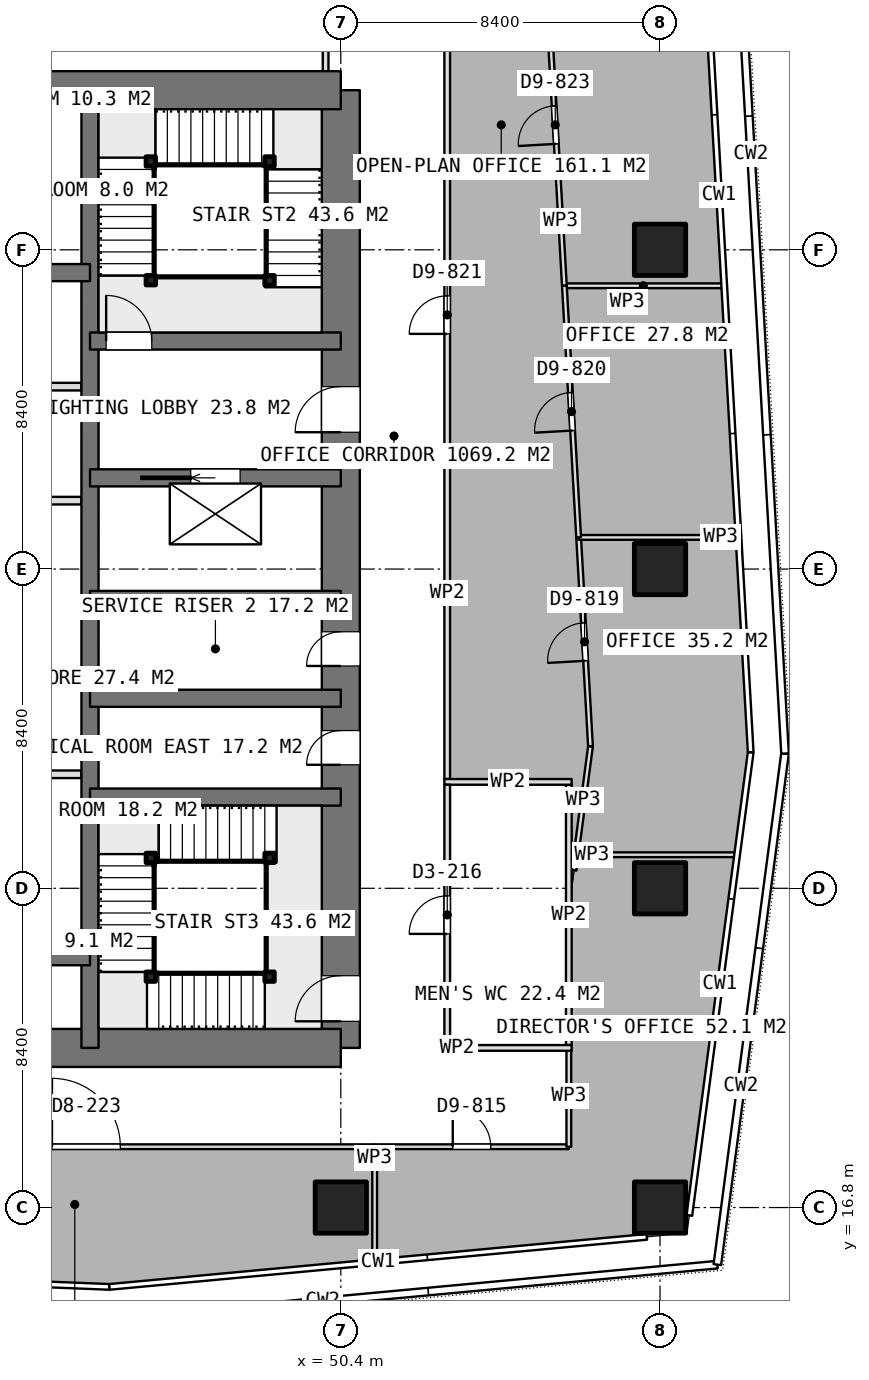
"""IFC4 building model, lengths in metres.
Left out: names, types, materials, properties, quantities, classifications, styles, units other than length and angle.
Written with IfcOpenShell. Run it as: python <this file> out.ifc"""

import sys

from ifc_helpers import new_model, si_unit, direction, frame, frame_2d, origin, origin_2d, place, context, subcontext, project, spatial, rectangle, extrude, element, fill, save


model = new_model("IFC4")
c1 = context("Model", 3, precision=1e-05, world=origin(), true_north=direction((0.0, 1.0)))
c2 = subcontext(c1, "Body", "Model", "MODEL_VIEW")
j1 = project(units=[si_unit("LENGTHUNIT", "METRE"), si_unit("PLANEANGLEUNIT", "RADIAN")], contexts=[c1])
p1 = place(None, origin())
s1 = spatial("IfcSite", under=j1, at=p1, CompositionType="ELEMENT")
p2 = place(p1, origin())
s2 = spatial("IfcBuilding", under=s1, at=p2, CompositionType="ELEMENT")
p3 = place(p2, frame((0.0, 0.0, 202.7)))
s3 = spatial("IfcBuildingStorey", under=s2, at=p3, CompositionType="ELEMENT", Elevation=202.7)
for number, where, z_axis, x_axis in (
    (1, (40.0, 21.0, 0.0), (0.0, 0.0, 1.0), (1.0, 0.0, 0.0)),
    (2, (40.0, 46.2, 0.0), (0.0, 0.0, 1.0), (1.0, 0.0, 0.0)),
):
    element("IfcWall", number, at=place(p3, frame(where, z_axis=z_axis, x_axis=x_axis)), inside=s3, PredefinedType="SHEAR", context=c2, shape_type="SweptSolid", body=[
        extrude(rectangle(XDim=10.4, YDim=1.0, at=frame_2d((5.2, 0.0))), origin(), (0.0, 0.0, 1.0), 3.75),
    ])
p4 = place(p3, frame((50.4, 21.0, 0.0), z_axis=(0.0, 0.0, 1.0), x_axis=(0.0, 1.0, 0.0)))
e3 = element("IfcWall", 3, at=p4, inside=s3, PredefinedType="SHEAR", context=c2, shape_type="SweptSolid", body=[
    extrude(rectangle(XDim=25.2, YDim=1.0, at=frame_2d((12.6, 0.0))), origin(), (0.0, 0.0, 1.0), 3.75),
])
p5 = place(p4, frame((16.2, 0.0, 0.0)))
e4 = element("IfcOpeningElement", 4, at=p5, cuts=e3, PredefinedType="OPENING", context=c2, shape_type="SweptSolid", body=[
    extrude(rectangle(XDim=1.2, YDim=2.1, at=frame_2d((0.6, 1.05))), frame((0.0, 0.51, 0.0), z_axis=(0.0, -1.0, 0.0), x_axis=(1.0, 0.0, 0.0)), (0.0, 0.0, 1.0), 1.02),
])
p6 = place(p4, frame((10.05, 0.0, 0.0)))
e5 = element("IfcOpeningElement", 5, at=p6, cuts=e3, PredefinedType="OPENING", context=c2, shape_type="SweptSolid", body=[
    extrude(rectangle(XDim=0.9, YDim=2.1, at=frame_2d((0.45, 1.05))), frame((0.0, 0.51, 0.0), z_axis=(0.0, -1.0, 0.0), x_axis=(1.0, 0.0, 0.0)), (0.0, 0.0, 1.0), 1.02),
])
p7 = place(p4, frame((7.45, 0.0, 0.0)))
e6 = element("IfcOpeningElement", 6, at=p7, cuts=e3, PredefinedType="OPENING", context=c2, shape_type="SweptSolid", body=[
    extrude(rectangle(XDim=0.9, YDim=2.1, at=frame_2d((0.45, 1.05))), frame((0.0, 0.51, 0.0), z_axis=(0.0, -1.0, 0.0), x_axis=(1.0, 0.0, 0.0)), (0.0, 0.0, 1.0), 1.02),
])
p8 = place(p4, frame((0.7, 0.0, 0.0)))
e7 = element("IfcOpeningElement", 7, at=p8, cuts=e3, PredefinedType="OPENING", context=c2, shape_type="SweptSolid", body=[
    extrude(rectangle(XDim=1.2, YDim=2.1, at=frame_2d((0.6, 1.05))), frame((0.0, 0.51, 0.0), z_axis=(0.0, -1.0, 0.0), x_axis=(1.0, 0.0, 0.0)), (0.0, 0.0, 1.0), 1.02),
])
p9 = place(p3, frame((43.8, 21.0, 0.0), z_axis=(0.0, 0.0, 1.0), x_axis=(0.0, 1.0, 0.0)))
e8 = element("IfcWall", 8, at=p9, inside=s3, PredefinedType="SHEAR", context=c2, shape_type="SweptSolid", body=[
    extrude(rectangle(XDim=25.2, YDim=0.45, at=frame_2d((12.6, 0.0))), origin(), (0.0, 0.0, 1.0), 3.75),
])
for number, where, z_axis, x_axis in (
    (9, (40.0, 23.4, 0.0), (0.0, 0.0, 1.0), (1.0, 0.0, 0.0)),
    (10, (40.0, 41.4, 0.0), (0.0, 0.0, 1.0), (1.0, 0.0, 0.0)),
):
    element("IfcWall", number, at=place(p3, frame(where, z_axis=z_axis, x_axis=x_axis)), inside=s3, PredefinedType="SHEAR", context=c2, shape_type="SweptSolid", body=[
        extrude(rectangle(XDim=3.8, YDim=0.45, at=frame_2d((1.9, 0.0))), origin(), (0.0, 0.0, 1.0), 3.75),
    ])
for number, where, z_axis, x_axis in (
    (11, (43.8, 27.6, 0.0), (0.0, 0.0, 1.0), (1.0, 0.0, 0.0)),
    (12, (43.8, 30.2, 0.0), (0.0, 0.0, 1.0), (1.0, 0.0, 0.0)),
    (13, (43.8, 32.8, 0.0), (0.0, 0.0, 1.0), (1.0, 0.0, 0.0)),
):
    element("IfcWall", number, at=place(p3, frame(where, z_axis=z_axis, x_axis=x_axis)), inside=s3, PredefinedType="SHEAR", context=c2, shape_type="SweptSolid", body=[
        extrude(rectangle(XDim=6.6, YDim=0.45, at=frame_2d((3.3, 0.0))), origin(), (0.0, 0.0, 1.0), 3.75),
    ])
p10 = place(p3, frame((43.8, 36.0, 0.0), z_axis=(0.0, 0.0, 1.0), x_axis=(1.0, 0.0, 0.0)))
e14 = element("IfcWall", 14, at=p10, inside=s3, PredefinedType="SHEAR", context=c2, shape_type="SweptSolid", body=[
    extrude(rectangle(XDim=6.6, YDim=0.45, at=frame_2d((3.3, 0.0))), origin(), (0.0, 0.0, 1.0), 3.75),
])
p11 = place(p10, frame((2.65, 0.0, 0.0)))
e15 = element("IfcOpeningElement", 15, at=p11, cuts=e14, PredefinedType="OPENING", context=c2, shape_type="SweptSolid", body=[
    extrude(rectangle(XDim=1.3, YDim=2.1, at=frame_2d((0.65, 1.05))), frame((0.0, 0.235, 0.0), z_axis=(0.0, -1.0, 0.0), x_axis=(1.0, 0.0, 0.0)), (0.0, 0.0, 1.0), 0.47),
])
p12 = place(p3, frame((43.8, 39.6, 0.0), z_axis=(0.0, 0.0, 1.0), x_axis=(1.0, 0.0, 0.0)))
e16 = element("IfcWall", 16, at=p12, inside=s3, PredefinedType="SHEAR", context=c2, shape_type="SweptSolid", body=[
    extrude(rectangle(XDim=6.6, YDim=0.45, at=frame_2d((3.3, 0.0))), origin(), (0.0, 0.0, 1.0), 3.75),
])
p13 = place(p12, frame((0.425, 0.0, 0.0)))
e17 = element("IfcOpeningElement", 17, at=p13, cuts=e16, PredefinedType="OPENING", context=c2, shape_type="SweptSolid", body=[
    extrude(rectangle(XDim=1.2, YDim=2.1, at=frame_2d((0.6, 1.05))), frame((0.0, 0.235, 0.0), z_axis=(0.0, -1.0, 0.0), x_axis=(1.0, 0.0, 0.0)), (0.0, 0.0, 1.0), 0.47),
])
for number, where, z_axis, x_axis in (
    (18, (50.4, 16.8, 0.0), (0.0, 0.0, 1.0), (1.0, 0.0, 0.0)),
    (19, (58.8, 16.8, 0.0), (0.0, 0.0, 1.0), (1.0, 0.0, 0.0)),
    (20, (58.8, 25.2, 0.0), (0.0, 0.0, 1.0), (1.0, 0.0, 0.0)),
    (21, (58.8, 33.6, 0.0), (0.0, 0.0, 1.0), (1.0, 0.0, 0.0)),
    (22, (58.8, 42.0, 0.0), (0.0, 0.0, 1.0), (1.0, 0.0, 0.0)),
):
    element("IfcColumn", number, at=place(p3, frame(where, z_axis=z_axis, x_axis=x_axis)), inside=s3, PredefinedType="COLUMN", context=c2, shape_type="SweptSolid", body=[
        extrude(rectangle(XDim=1.35, YDim=1.35, at=origin_2d()), origin(), (0.0, 0.0, 1.0), 3.75),
    ])
for number, where, z_axis, x_axis in (
    (23, (40.225, 35.4, 0.0), (0.0, 0.0, 1.0), (1.0, 0.0, 0.0)),
    (24, (40.225, 38.4, 0.0), (0.0, 0.0, 1.0), (1.0, 0.0, 0.0)),
    (25, (40.225, 28.2, 0.0), (0.0, 0.0, 1.0), (1.0, 0.0, 0.0)),
):
    element("IfcWall", number, at=place(p3, frame(where, z_axis=z_axis, x_axis=x_axis)), inside=s3, PredefinedType="PARTITIONING", context=c2, shape_type="SweptSolid", body=[
        extrude(rectangle(XDim=3.35, YDim=0.2, at=frame_2d((1.675, 0.0))), origin(), (0.0, 0.0, 1.0), 3.5),
    ])
p14 = place(p3, frame((40.0, 43.5, 0.0), z_axis=(0.0, 0.0, 1.0), x_axis=(1.0, 0.0, 0.0)))
e26 = element("IfcWall", 26, at=p14, inside=s3, PredefinedType="PARTITIONING", context=c2, shape_type="SweptSolid", body=[
    extrude(rectangle(XDim=3.575, YDim=0.2, at=frame_2d((1.788, 0.0))), origin(), (0.0, 0.0, 1.0), 3.5),
])
p15 = place(p3, frame((50.0, 46.7, 0.0), z_axis=(0.0, 0.0, 1.0), x_axis=(0.0, 1.0, 0.0)))
e27 = element("IfcWall", 27, at=p15, inside=s3, PredefinedType="PARTITIONING", context=c2, shape_type="SweptSolid", body=[
    extrude(rectangle(XDim=2.625, YDim=0.15, at=frame_2d((1.312, 0.0))), origin(), (0.0, 0.0, 1.0), 3.5),
])
for number, where, z_axis, x_axis in (
    (28, (53.125, 21.0, 0.0), (0.0, 0.0, 1.0), (1.0, 0.0, 0.0)),
    (29, (53.125, 28.0, 0.0), (0.0, 0.0, 1.0), (1.0, 0.0, 0.0)),
):
    element("IfcWall", number, at=place(p3, frame(where, z_axis=z_axis, x_axis=x_axis)), inside=s3, PredefinedType="PARTITIONING", context=c2, shape_type="SweptSolid", body=[
        extrude(rectangle(XDim=3.35, YDim=0.15, at=frame_2d((1.675, 0.0))), origin(), (0.0, 0.0, 1.0), 3.5),
    ])
p16 = place(p3, frame((53.2, 21.075, 0.0), z_axis=(0.0, 0.0, 1.0), x_axis=(0.0, 1.0, 0.0)))
e30 = element("IfcWall", 30, at=p16, inside=s3, PredefinedType="PARTITIONING", context=c2, shape_type="SweptSolid", body=[
    extrude(rectangle(XDim=6.85, YDim=0.15, at=frame_2d((3.425, 0.0))), origin(), (0.0, 0.0, 1.0), 3.5),
])
p17 = place(p16, frame((2.925, 0.0, 0.0)))
e31 = element("IfcOpeningElement", 31, at=p17, cuts=e30, PredefinedType="OPENING", context=c2, shape_type="SweptSolid", body=[
    extrude(rectangle(XDim=1.0, YDim=2.1, at=frame_2d((0.5, 1.05))), frame((0.0, 0.085, 0.0), z_axis=(0.0, -1.0, 0.0), x_axis=(1.0, 0.0, 0.0)), (0.0, 0.0, 1.0), 0.17),
])
p18 = place(p3, frame((56.4, 21.075, 0.0), z_axis=(0.0, 0.0, 1.0), x_axis=(0.0, 1.0, 0.0)))
e32 = element("IfcWall", 32, at=p18, inside=s3, PredefinedType="PARTITIONING", context=c2, shape_type="SweptSolid", body=[
    extrude(rectangle(XDim=6.85, YDim=0.15, at=frame_2d((3.425, 0.0))), origin(), (0.0, 0.0, 1.0), 3.5),
])
p19 = place(p3, frame((51.291, 15.442, 0.0), z_axis=(0.0, 0.0, 1.0), x_axis=(0.0, 1.0, 0.0)))
e33 = element("IfcWall", 33, at=p19, inside=s3, PredefinedType="PARTITIONING", context=c2, shape_type="SweptSolid", body=[
    extrude(rectangle(XDim=2.958, YDim=0.125, at=frame_2d((1.479, 0.0))), origin(), (0.0, 0.0, 1.0), 3.5),
])
p20 = place(p3, frame((51.291, 18.4, 0.0), z_axis=(0.0, 0.0, 1.0), x_axis=(1.0, 0.0, 0.0)))
e34 = element("IfcWall", 34, at=p20, inside=s3, PredefinedType="PARTITIONING", context=c2, shape_type="SweptSolid", body=[
    extrude(rectangle(XDim=5.109, YDim=0.125, at=frame_2d((2.554, 0.0))), origin(), (0.0, 0.0, 1.0), 3.5),
])
p21 = place(p20, frame((2.055, 0.0, 0.0)))
e35 = element("IfcOpeningElement", 35, at=p21, cuts=e34, PredefinedType="OPENING", context=c2, shape_type="SweptSolid", body=[
    extrude(rectangle(XDim=1.0, YDim=2.1, at=frame_2d((0.5, 1.05))), frame((0.0, 0.073, 0.0), z_axis=(0.0, -1.0, 0.0), x_axis=(1.0, 0.0, 0.0)), (0.0, 0.0, 1.0), 0.145),
])
p22 = place(p3, frame((56.4, 18.4, 0.0), z_axis=(0.0, 0.0, 1.0), x_axis=(0.0, 1.0, 0.0)))
e36 = element("IfcWall", 36, at=p22, inside=s3, PredefinedType="PARTITIONING", context=c2, shape_type="SweptSolid", body=[
    extrude(rectangle(XDim=2.675, YDim=0.125, at=frame_2d((1.337, 0.0))), origin(), (0.0, 0.0, 1.0), 3.5),
])
p23 = place(p3, frame((56.538, 25.675, 0.0), z_axis=(0.0, 0.0, 1.0), x_axis=(0.131114399239, 0.991367244926, 0.0)))
e37 = element("IfcWall", 37, at=p23, inside=s3, PredefinedType="PARTITIONING", context=c2, shape_type="SweptSolid", body=[
    extrude(rectangle(XDim=0.412, YDim=0.125, at=frame_2d((0.206, 0.0))), origin(), (0.0, 0.0, 1.0), 3.5),
])
p24 = place(p3, frame((56.592, 26.083, 0.0), z_axis=(0.0, 0.0, 1.0), x_axis=(1.0, 0.0, 0.0)))
e38 = element("IfcWall", 38, at=p24, inside=s3, PredefinedType="PARTITIONING", context=c2, shape_type="SweptSolid", body=[
    extrude(rectangle(XDim=4.186, YDim=0.125, at=frame_2d((2.093, 0.0))), origin(), (0.0, 0.0, 1.0), 3.5),
])
p25 = place(p3, frame((56.592, 26.084, 0.0), z_axis=(0.0, 0.0, 1.0), x_axis=(0.131274902855, 0.991346004118, 0.0)))
e39 = element("IfcWall", 39, at=p25, inside=s3, PredefinedType="PARTITIONING", context=c2, shape_type="SweptSolid", body=[
    extrude(rectangle(XDim=2.879, YDim=0.125, at=frame_2d((1.439, 0.0))), origin(), (0.0, 0.0, 1.0), 3.5),
])
p26 = place(p3, frame((56.97, 28.938, 0.0), z_axis=(0.0, 0.0, 1.0), x_axis=(-0.056688504788, 0.998391913742, 0.0)))
e40 = element("IfcWall", 40, at=p26, inside=s3, PredefinedType="PARTITIONING", context=c2, shape_type="SweptSolid", body=[
    extrude(rectangle(XDim=5.504, YDim=0.125, at=frame_2d((2.752, 0.0))), origin(), (0.0, 0.0, 1.0), 3.5),
])
p27 = place(p26, frame((2.252, 0.0, 0.0)))
e41 = element("IfcOpeningElement", 41, at=p27, cuts=e40, PredefinedType="OPENING", context=c2, shape_type="SweptSolid", body=[
    extrude(rectangle(XDim=1.0, YDim=2.1, at=frame_2d((0.5, 1.05))), frame((0.0, 0.073, 0.0), z_axis=(0.0, -1.0, 0.0), x_axis=(1.0, 0.0, 0.0)), (0.0, 0.0, 1.0), 0.145),
])
p28 = place(p3, frame((56.658, 34.433, 0.0), z_axis=(0.0, 0.0, 1.0), x_axis=(1.0, 0.0, 0.0)))
e42 = element("IfcWall", 42, at=p28, inside=s3, PredefinedType="PARTITIONING", context=c2, shape_type="SweptSolid", body=[
    extrude(rectangle(XDim=4.157, YDim=0.125, at=frame_2d((2.079, 0.0))), origin(), (0.0, 0.0, 1.0), 3.5),
])
p29 = place(p3, frame((56.658, 34.434, 0.0), z_axis=(0.0, 0.0, 1.0), x_axis=(-0.056556940453, 0.998399375244, 0.0)))
e43 = element("IfcWall", 43, at=p29, inside=s3, PredefinedType="PARTITIONING", context=c2, shape_type="SweptSolid", body=[
    extrude(rectangle(XDim=6.63, YDim=0.125, at=frame_2d((3.315, 0.0))), origin(), (0.0, 0.0, 1.0), 3.5),
])
p30 = place(p29, frame((2.815, 0.0, 0.0)))
e44 = element("IfcOpeningElement", 44, at=p30, cuts=e43, PredefinedType="OPENING", context=c2, shape_type="SweptSolid", body=[
    extrude(rectangle(XDim=1.0, YDim=2.1, at=frame_2d((0.5, 1.05))), frame((0.0, 0.073, 0.0), z_axis=(0.0, -1.0, 0.0), x_axis=(1.0, 0.0, 0.0)), (0.0, 0.0, 1.0), 0.145),
])
p31 = place(p3, frame((56.283, 41.054, 0.0), z_axis=(0.0, 0.0, 1.0), x_axis=(1.0, 0.0, 0.0)))
e45 = element("IfcWall", 45, at=p31, inside=s3, PredefinedType="PARTITIONING", context=c2, shape_type="SweptSolid", body=[
    extrude(rectangle(XDim=4.156, YDim=0.125, at=frame_2d((2.078, 0.0))), origin(), (0.0, 0.0, 1.0), 3.5),
])
p32 = place(p3, frame((56.283, 41.055, 0.0), z_axis=(0.0, 0.0, 1.0), x_axis=(-0.056725059265, 0.998389837514, 0.0)))
e46 = element("IfcWall", 46, at=p32, inside=s3, PredefinedType="PARTITIONING", context=c2, shape_type="SweptSolid", body=[
    extrude(rectangle(XDim=8.479, YDim=0.125, at=frame_2d((4.239, 0.0))), origin(), (0.0, 0.0, 1.0), 3.5),
])
p33 = place(p32, frame((3.739, 0.0, 0.0)))
e47 = element("IfcOpeningElement", 47, at=p33, cuts=e46, PredefinedType="OPENING", context=c2, shape_type="SweptSolid", body=[
    extrude(rectangle(XDim=1.0, YDim=2.1, at=frame_2d((0.5, 1.05))), frame((0.0, 0.073, 0.0), z_axis=(0.0, -1.0, 0.0), x_axis=(1.0, 0.0, 0.0)), (0.0, 0.0, 1.0), 0.145),
])
p34 = place(p3, frame((53.2, 28.075, 0.0), z_axis=(0.0, 0.0, 1.0), x_axis=(0.0, 1.0, 0.0)))
e48 = element("IfcWall", 48, at=p34, inside=s3, PredefinedType="PARTITIONING", context=c2, shape_type="SweptSolid", body=[
    extrude(rectangle(XDim=24.5, YDim=0.15, at=frame_2d((12.25, 0.0))), origin(), (0.0, 0.0, 1.0), 3.5),
])
p35 = place(p34, frame((11.713, 0.0, 0.0)))
e49 = element("IfcOpeningElement", 49, at=p35, cuts=e48, PredefinedType="OPENING", context=c2, shape_type="SweptSolid", body=[
    extrude(rectangle(XDim=1.0, YDim=2.1, at=frame_2d((0.5, 1.05))), frame((0.0, 0.085, 0.0), z_axis=(0.0, -1.0, 0.0), x_axis=(1.0, 0.0, 0.0)), (0.0, 0.0, 1.0), 0.17),
])
p36 = place(p3, frame((35.508, 18.4, 0.0), z_axis=(0.0, 0.0, 1.0), x_axis=(1.0, 0.0, 0.0)))
e50 = element("IfcWall", 50, at=p36, inside=s3, PredefinedType="PARTITIONING", context=c2, shape_type="SweptSolid", body=[
    extrude(rectangle(XDim=15.783, YDim=0.125, at=frame_2d((7.892, 0.0))), origin(), (0.0, 0.0, 1.0), 3.5),
])
p37 = place(p36, frame((7.291, 0.0, 0.0)))
e51 = element("IfcOpeningElement", 51, at=p37, cuts=e50, PredefinedType="OPENING", context=c2, shape_type="SweptSolid", body=[
    extrude(rectangle(XDim=1.8, YDim=2.1, at=frame_2d((0.9, 1.05))), frame((0.0, 0.073, 0.0), z_axis=(0.0, -1.0, 0.0), x_axis=(1.0, 0.0, 0.0)), (0.0, 0.0, 1.0), 0.145),
])
for number, where, z_axis, x_axis in (
    (52, (45.4, 41.2, 0.0), (0.0, 0.0, 1.0), (1.0, 0.0, 0.0)),
    (53, (45.4, 44.325, 0.0), (0.0, 0.0, 1.0), (1.0, 0.0, 0.0)),
    (54, (48.525, 44.325, 0.0), (0.0, 0.0, 1.0), (1.0, 0.0, 0.0)),
    (55, (48.525, 41.2, 0.0), (0.0, 0.0, 1.0), (1.0, 0.0, 0.0)),
    (56, (48.525, 22.875, 0.0), (0.0, 0.0, 1.0), (1.0, 0.0, 0.0)),
    (57, (45.4, 22.875, 0.0), (0.0, 0.0, 1.0), (1.0, 0.0, 0.0)),
    (58, (45.4, 26.0, 0.0), (0.0, 0.0, 1.0), (1.0, 0.0, 0.0)),
    (59, (48.525, 26.0, 0.0), (0.0, 0.0, 1.0), (1.0, 0.0, 0.0)),
):
    element("IfcColumn", number, at=place(p3, frame(where, z_axis=z_axis, x_axis=x_axis)), inside=s3, PredefinedType="COLUMN", context=c2, shape_type="SweptSolid", body=[
        extrude(rectangle(XDim=0.25, YDim=0.25, at=origin_2d()), origin(), (0.0, 0.0, 1.0), 3.75),
    ])
p38 = place(p5, origin())
e60 = element("IfcDoor", 60, at=p38, inside=s3, OperationType="SINGLE_SWING_LEFT", PredefinedType="DOOR", context=c2, shape_type="SweptSolid", body=[
    extrude(rectangle(XDim=1.2, YDim=2.1, at=frame_2d((0.6, 1.05))), frame((0.0, 0.025, 0.0), z_axis=(0.0, -1.0, 0.0), x_axis=(1.0, 0.0, 0.0)), (0.0, 0.0, 1.0), 0.05),
])
fill(e4, e60)
p39 = place(p6, origin())
e61 = element("IfcDoor", 61, at=p39, inside=s3, OperationType="SINGLE_SWING_LEFT", PredefinedType="DOOR", context=c2, shape_type="SweptSolid", body=[
    extrude(rectangle(XDim=0.9, YDim=2.1, at=frame_2d((0.45, 1.05))), frame((0.0, 0.025, 0.0), z_axis=(0.0, -1.0, 0.0), x_axis=(1.0, 0.0, 0.0)), (0.0, 0.0, 1.0), 0.05),
])
fill(e5, e61)
p40 = place(p7, origin())
e62 = element("IfcDoor", 62, at=p40, inside=s3, OperationType="SINGLE_SWING_LEFT", PredefinedType="DOOR", context=c2, shape_type="SweptSolid", body=[
    extrude(rectangle(XDim=0.9, YDim=2.1, at=frame_2d((0.45, 1.05))), frame((0.0, 0.025, 0.0), z_axis=(0.0, -1.0, 0.0), x_axis=(1.0, 0.0, 0.0)), (0.0, 0.0, 1.0), 0.05),
])
fill(e6, e62)
p41 = place(p11, origin())
e63 = element("IfcDoor", 63, at=p41, inside=s3, OperationType="SLIDING_TO_LEFT", PredefinedType="USERDEFINED", context=c2, shape_type="SweptSolid", body=[
    extrude(rectangle(XDim=1.3, YDim=2.1, at=frame_2d((0.65, 1.05))), frame((0.0, 0.025, 0.0), z_axis=(0.0, -1.0, 0.0), x_axis=(1.0, 0.0, 0.0)), (0.0, 0.0, 1.0), 0.05),
])
fill(e15, e63)
p42 = place(p17, origin())
e64 = element("IfcDoor", 64, at=p42, inside=s3, OperationType="SINGLE_SWING_LEFT", PredefinedType="DOOR", context=c2, shape_type="SweptSolid", body=[
    extrude(rectangle(XDim=1.0, YDim=2.1, at=frame_2d((0.5, 1.05))), frame((0.0, 0.025, 0.0), z_axis=(0.0, -1.0, 0.0), x_axis=(1.0, 0.0, 0.0)), (0.0, 0.0, 1.0), 0.05),
])
fill(e31, e64)
p43 = place(p21, origin())
e65 = element("IfcDoor", 65, at=p43, inside=s3, OperationType="SINGLE_SWING_LEFT", PredefinedType="DOOR", context=c2, shape_type="SweptSolid", body=[
    extrude(rectangle(XDim=1.0, YDim=2.1, at=frame_2d((0.5, 1.05))), frame((0.0, 0.025, 0.0), z_axis=(0.0, -1.0, 0.0), x_axis=(1.0, 0.0, 0.0)), (0.0, 0.0, 1.0), 0.05),
])
fill(e35, e65)
p44 = place(p27, origin())
e66 = element("IfcDoor", 66, at=p44, inside=s3, OperationType="SINGLE_SWING_LEFT", PredefinedType="DOOR", context=c2, shape_type="SweptSolid", body=[
    extrude(rectangle(XDim=1.0, YDim=2.1, at=frame_2d((0.5, 1.05))), frame((0.0, 0.025, 0.0), z_axis=(0.0, -1.0, 0.0), x_axis=(1.0, 0.0, 0.0)), (0.0, 0.0, 1.0), 0.05),
])
fill(e41, e66)
p45 = place(p30, origin())
e67 = element("IfcDoor", 67, at=p45, inside=s3, OperationType="SINGLE_SWING_LEFT", PredefinedType="DOOR", context=c2, shape_type="SweptSolid", body=[
    extrude(rectangle(XDim=1.0, YDim=2.1, at=frame_2d((0.5, 1.05))), frame((0.0, 0.025, 0.0), z_axis=(0.0, -1.0, 0.0), x_axis=(1.0, 0.0, 0.0)), (0.0, 0.0, 1.0), 0.05),
])
fill(e44, e67)
p46 = place(p33, origin())
e68 = element("IfcDoor", 68, at=p46, inside=s3, OperationType="SINGLE_SWING_LEFT", PredefinedType="DOOR", context=c2, shape_type="SweptSolid", body=[
    extrude(rectangle(XDim=1.0, YDim=2.1, at=frame_2d((0.5, 1.05))), frame((0.0, 0.025, 0.0), z_axis=(0.0, -1.0, 0.0), x_axis=(1.0, 0.0, 0.0)), (0.0, 0.0, 1.0), 0.05),
])
fill(e47, e68)
p47 = place(p35, origin())
e69 = element("IfcDoor", 69, at=p47, inside=s3, OperationType="SINGLE_SWING_LEFT", PredefinedType="DOOR", context=c2, shape_type="SweptSolid", body=[
    extrude(rectangle(XDim=1.0, YDim=2.1, at=frame_2d((0.5, 1.05))), frame((0.0, 0.025, 0.0), z_axis=(0.0, -1.0, 0.0), x_axis=(1.0, 0.0, 0.0)), (0.0, 0.0, 1.0), 0.05),
])
fill(e49, e69)
p48 = place(p37, origin())
e70 = element("IfcDoor", 70, at=p48, inside=s3, OperationType="DOUBLE_DOOR_SINGLE_SWING", PredefinedType="DOOR", context=c2, shape_type="SweptSolid", body=[
    extrude(rectangle(XDim=1.8, YDim=2.1, at=frame_2d((0.9, 1.05))), frame((0.0, 0.025, 0.0), z_axis=(0.0, -1.0, 0.0), x_axis=(1.0, 0.0, 0.0)), (0.0, 0.0, 1.0), 0.05),
])
fill(e51, e70)
p49 = place(p13, origin())
e71 = element("IfcDoor", 71, at=p49, inside=s3, OperationType="SINGLE_SWING_RIGHT", PredefinedType="DOOR", context=c2, shape_type="SweptSolid", body=[
    extrude(rectangle(XDim=1.2, YDim=2.1, at=frame_2d((0.6, 1.05))), frame((0.0, 0.025, 0.0), z_axis=(0.0, -1.0, 0.0), x_axis=(1.0, 0.0, 0.0)), (0.0, 0.0, 1.0), 0.05),
])
fill(e17, e71)
p50 = place(p8, origin())
e72 = element("IfcDoor", 72, at=p50, inside=s3, OperationType="SINGLE_SWING_RIGHT", PredefinedType="DOOR", context=c2, shape_type="SweptSolid", body=[
    extrude(rectangle(XDim=1.2, YDim=2.1, at=frame_2d((0.6, 1.05))), frame((0.0, 0.025, 0.0), z_axis=(0.0, -1.0, 0.0), x_axis=(1.0, 0.0, 0.0)), (0.0, 0.0, 1.0), 0.05),
])
fill(e7, e72)
save(model, sys.argv[1])
